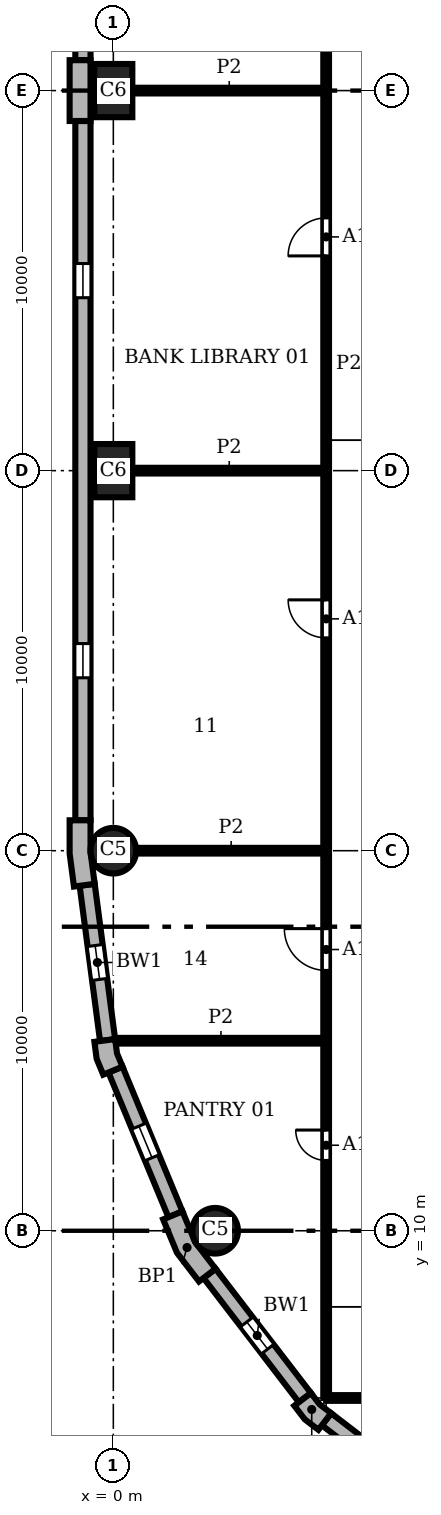
"""IFC4 building model, lengths in metres.
Left out: names, types, materials, properties, quantities, classifications, styles, units other than length and angle.
Written with IfcOpenShell. Run it as: python <this file> out.ifc"""

import sys

from ifc_helpers import new_model, si_unit, direction, frame, frame_2d, origin, origin_2d, place, context, subcontext, project, spatial, polyline, rectangle, circle, outline, extrude, element, fill, save


model = new_model("IFC4")
c1 = context("Model", 3, precision=1e-05, world=origin(), true_north=direction((0.0, 1.0)))
c2 = subcontext(c1, "Body", "Model", "MODEL_VIEW")
j1 = project(units=[si_unit("LENGTHUNIT", "METRE"), si_unit("PLANEANGLEUNIT", "RADIAN")], contexts=[c1])
p1 = place(None, origin())
s1 = spatial("IfcSite", under=j1, at=p1, CompositionType="ELEMENT")
p2 = place(p1, origin())
s2 = spatial("IfcBuilding", under=s1, at=p2, CompositionType="ELEMENT")
p3 = place(p2, frame((0.0, 0.0, 12.0)))
s3 = spatial("IfcBuildingStorey", under=s2, at=p3, CompositionType="ELEMENT", Elevation=12.0)
for number, where, z_axis, x_axis in (
    (1, (0.0, 40.0, 0.0), (0.0, 0.0, 1.0), (0.0, 1.0, 0.0)),
    (2, (0.0, 30.0, 0.0), (0.0, 0.0, 1.0), (0.0, 1.0, 0.0)),
):
    element("IfcColumn", number, at=place(p3, frame(where, z_axis=z_axis, x_axis=x_axis)), inside=s3, PredefinedType="COLUMN", context=c2, shape_type="SweptSolid", body=[
        extrude(rectangle(XDim=1.4, YDim=1.0, at=origin_2d()), origin(), (0.0, 0.0, 1.0), 3.9),
    ])
for number, where, z_axis, x_axis in (
    (3, (0.0, 20.0, 0.0), (0.0, 0.0, 1.0), (1.0, 0.0, 0.0)),
    (4, (2.679, 10.0, 0.0), (0.0, 0.0, 1.0), (1.0, 0.0, 0.0)),
):
    element("IfcColumn", number, at=place(p3, frame(where, z_axis=z_axis, x_axis=x_axis)), inside=s3, PredefinedType="COLUMN", context=c2, shape_type="SweptSolid", body=[
        extrude(circle(Radius=0.6, at=origin_2d()), origin(), (0.0, 0.0, 1.0), 3.9),
    ])
p4 = place(p3, origin())
e5 = element("IfcWall", 5, at=p4, inside=s3, PredefinedType="SOLIDWALL", context=c2, shape_type="SweptSolid", body=[
    extrude(outline(polyline([(-1.0, 40.8), (-1.15, 40.8), (-1.15, 40.0), (-1.15, 39.2), (-1.0, 39.2), (-0.6, 39.2), (-0.6, 40.0), (-0.6, 40.8), (-1.0, 40.8)])), origin(), (0.0, 0.0, 1.0), 3.9),
])
e6 = element("IfcWall", 6, at=p4, inside=s3, PredefinedType="SOLIDWALL", context=c2, shape_type="SweptSolid", body=[
    extrude(outline(polyline([(-1.0, 20.8), (-1.15, 20.8), (-1.15, 19.925), (-1.036, 19.057), (-0.887, 19.076), (-0.49, 19.128), (-0.6, 19.961), (-0.6, 20.8), (-1.0, 20.8)])), origin(), (0.0, 0.0, 1.0), 3.9),
])
e7 = element("IfcWall", 7, at=p4, inside=s3, PredefinedType="SOLIDWALL", context=c2, shape_type="SweptSolid", body=[
    extrude(outline(polyline([(-0.349, 14.99), (-0.498, 14.971), (-0.439, 14.523), (-0.266, 14.106), (-0.128, 14.164), (0.242, 14.317), (0.097, 14.667), (0.047, 15.043), (-0.349, 14.99)])), origin(), (0.0, 0.0, 1.0), 3.9),
])
e8 = element("IfcWall", 8, at=p4, inside=s3, PredefinedType="SOLIDWALL", context=c2, shape_type="SweptSolid", body=[
    extrude(outline(polyline([(1.449, 10.356), (1.311, 10.299), (1.675, 9.42), (2.254, 8.665), (2.373, 8.757), (2.69, 9.0), (2.155, 9.698), (1.819, 10.51), (1.449, 10.356)])), origin(), (0.0, 0.0, 1.0), 3.9),
])
e9 = element("IfcWall", 9, at=p4, inside=s3, PredefinedType="SOLIDWALL", context=c2, shape_type="SweptSolid", body=[
    extrude(outline(polyline([(4.882, 5.487), (4.763, 5.396), (5.038, 5.038), (5.396, 4.763), (5.487, 4.882), (5.731, 5.199), (5.43, 5.43), (5.199, 5.731), (4.882, 5.487)])), origin(), (0.0, 0.0, 1.0), 3.9),
])
p5 = place(p3, frame((-0.8, 59.2, 0.0), z_axis=(0.0, 0.0, 1.0), x_axis=(0.0, -1.0, 0.0)))
e10 = element("IfcWall", 10, at=p5, inside=s3, PredefinedType="SOLIDWALL", context=c2, shape_type="SweptSolid", body=[
    extrude(rectangle(XDim=18.4, YDim=0.4, at=frame_2d((9.2, 0.0))), origin(), (0.0, 0.0, 1.0), 3.9),
])
p6 = place(p5, frame((3.75, 0.0, 0.9)))
e11 = element("IfcOpeningElement", 11, at=p6, cuts=e10, PredefinedType="OPENING", context=c2, shape_type="SweptSolid", body=[
    extrude(rectangle(XDim=0.9, YDim=2.35, at=frame_2d((0.45, 1.175))), frame((0.0, 0.21, 0.0), z_axis=(0.0, -1.0, 0.0), x_axis=(1.0, 0.0, 0.0)), (0.0, 0.0, 1.0), 0.42),
])
p7 = place(p5, frame((13.75, 0.0, 0.9)))
e12 = element("IfcOpeningElement", 12, at=p7, cuts=e10, PredefinedType="OPENING", context=c2, shape_type="SweptSolid", body=[
    extrude(rectangle(XDim=0.9, YDim=2.35, at=frame_2d((0.45, 1.175))), frame((0.0, 0.21, 0.0), z_axis=(0.0, -1.0, 0.0), x_axis=(1.0, 0.0, 0.0)), (0.0, 0.0, 1.0), 0.42),
])
p8 = place(p3, frame((-0.8, 39.2, 0.0), z_axis=(0.0, 0.0, 1.0), x_axis=(0.0, -1.0, 0.0)))
e13 = element("IfcWall", 13, at=p8, inside=s3, PredefinedType="SOLIDWALL", context=c2, shape_type="SweptSolid", body=[
    extrude(rectangle(XDim=18.4, YDim=0.4, at=frame_2d((9.2, 0.0))), origin(), (0.0, 0.0, 1.0), 3.9),
])
p9 = place(p8, frame((3.75, 0.0, 0.9)))
e14 = element("IfcOpeningElement", 14, at=p9, cuts=e13, PredefinedType="OPENING", context=c2, shape_type="SweptSolid", body=[
    extrude(rectangle(XDim=0.9, YDim=2.35, at=frame_2d((0.45, 1.175))), frame((0.0, 0.21, 0.0), z_axis=(0.0, -1.0, 0.0), x_axis=(1.0, 0.0, 0.0)), (0.0, 0.0, 1.0), 0.42),
])
p10 = place(p8, frame((13.75, 0.0, 0.9)))
e15 = element("IfcOpeningElement", 15, at=p10, cuts=e13, PredefinedType="OPENING", context=c2, shape_type="SweptSolid", body=[
    extrude(rectangle(XDim=0.9, YDim=2.35, at=frame_2d((0.45, 1.175))), frame((0.0, 0.21, 0.0), z_axis=(0.0, -1.0, 0.0), x_axis=(1.0, 0.0, 0.0)), (0.0, 0.0, 1.0), 0.42),
])
p11 = place(p3, frame((-0.689, 19.102, 0.0), z_axis=(0.0, 0.0, 1.0), x_axis=(0.130514280502, -0.991446429508, 0.0)))
e16 = element("IfcWall", 16, at=p11, inside=s3, PredefinedType="SOLIDWALL", context=c2, shape_type="SweptSolid", body=[
    extrude(rectangle(XDim=4.121, YDim=0.4, at=frame_2d((2.061, 0.0))), origin(), (0.0, 0.0, 1.0), 3.9),
])
p12 = place(p11, frame((1.611, 0.0, 0.9)))
e17 = element("IfcOpeningElement", 17, at=p12, cuts=e16, PredefinedType="OPENING", context=c2, shape_type="SweptSolid", body=[
    extrude(rectangle(XDim=0.9, YDim=2.35, at=frame_2d((0.45, 1.175))), frame((0.0, 0.21, 0.0), z_axis=(0.0, -1.0, 0.0), x_axis=(1.0, 0.0, 0.0)), (0.0, 0.0, 1.0), 0.42),
])
p13 = place(p3, frame((0.057, 14.24, 0.0), z_axis=(0.0, 0.0, 1.0), x_axis=(0.382721546029, -0.923863744394, 0.0)))
e18 = element("IfcWall", 18, at=p13, inside=s3, PredefinedType="SOLIDWALL", context=c2, shape_type="SweptSolid", body=[
    extrude(rectangle(XDim=4.121, YDim=0.4, at=frame_2d((2.061, 0.0))), origin(), (0.0, 0.0, 1.0), 3.9),
])
p14 = place(p13, frame((1.611, 0.0, 0.9)))
e19 = element("IfcOpeningElement", 19, at=p14, cuts=e18, PredefinedType="OPENING", context=c2, shape_type="SweptSolid", body=[
    extrude(rectangle(XDim=0.9, YDim=2.35, at=frame_2d((0.45, 1.175))), frame((0.0, 0.21, 0.0), z_axis=(0.0, -1.0, 0.0), x_axis=(1.0, 0.0, 0.0)), (0.0, 0.0, 1.0), 0.42),
])
p15 = place(p3, frame((2.532, 8.878, 0.0), z_axis=(0.0, 0.0, 1.0), x_axis=(0.608759824817, -0.793354571229, 0.0)))
e20 = element("IfcWall", 20, at=p15, inside=s3, PredefinedType="SOLIDWALL", context=c2, shape_type="SweptSolid", body=[
    extrude(rectangle(XDim=4.121, YDim=0.4, at=frame_2d((2.061, 0.0))), origin(), (0.0, 0.0, 1.0), 3.9),
])
p16 = place(p15, frame((1.611, 0.0, 0.9)))
e21 = element("IfcOpeningElement", 21, at=p16, cuts=e20, PredefinedType="OPENING", context=c2, shape_type="SweptSolid", body=[
    extrude(rectangle(XDim=0.9, YDim=2.35, at=frame_2d((0.45, 1.175))), frame((0.0, 0.21, 0.0), z_axis=(0.0, -1.0, 0.0), x_axis=(1.0, 0.0, 0.0)), (0.0, 0.0, 1.0), 0.42),
])
p17 = place(p3, frame((5.609, 5.041, 0.0), z_axis=(0.0, 0.0, 1.0), x_axis=(0.793354571229, -0.608759824817, 0.0)))
e22 = element("IfcWall", 22, at=p17, inside=s3, PredefinedType="SOLIDWALL", context=c2, shape_type="SweptSolid", body=[
    extrude(rectangle(XDim=4.121, YDim=0.4, at=frame_2d((2.061, 0.0))), origin(), (0.0, 0.0, 1.0), 3.9),
])
p18 = place(p17, frame((1.611, 0.0, 0.9)))
e23 = element("IfcOpeningElement", 23, at=p18, cuts=e22, PredefinedType="OPENING", context=c2, shape_type="SweptSolid", body=[
    extrude(rectangle(XDim=0.9, YDim=2.35, at=frame_2d((0.45, 1.175))), frame((0.0, 0.21, 0.0), z_axis=(0.0, -1.0, 0.0), x_axis=(1.0, 0.0, 0.0)), (0.0, 0.0, 1.0), 0.42),
])
p19 = place(p3, frame((5.6, 5.6, 0.0), z_axis=(0.0, 0.0, 1.0), x_axis=(0.0, 1.0, 0.0)))
e24 = element("IfcWall", 24, at=p19, inside=s3, PredefinedType="PARTITIONING", context=c2, shape_type="SweptSolid", body=[
    extrude(rectangle(XDim=54.4, YDim=0.15, at=frame_2d((27.2, 0.0))), origin(), (0.0, 0.0, 1.0), 3.58),
])
p20 = place(p19, frame((6.25, 0.0, 0.0)))
e25 = element("IfcOpeningElement", 25, at=p20, cuts=e24, PredefinedType="OPENING", context=c2, shape_type="SweptSolid", body=[
    extrude(rectangle(XDim=0.8, YDim=2.1, at=frame_2d((0.4, 1.05))), frame((0.0, 0.085, 0.0), z_axis=(0.0, -1.0, 0.0), x_axis=(1.0, 0.0, 0.0)), (0.0, 0.0, 1.0), 0.17),
])
p21 = place(p19, frame((11.25, 0.0, 0.0)))
e26 = element("IfcOpeningElement", 26, at=p21, cuts=e24, PredefinedType="OPENING", context=c2, shape_type="SweptSolid", body=[
    extrude(rectangle(XDim=1.1, YDim=2.1, at=frame_2d((0.55, 1.05))), frame((0.0, 0.085, 0.0), z_axis=(0.0, -1.0, 0.0), x_axis=(1.0, 0.0, 0.0)), (0.0, 0.0, 1.0), 0.17),
])
p22 = place(p19, frame((20.0, 0.0, 0.0)))
e27 = element("IfcOpeningElement", 27, at=p22, cuts=e24, PredefinedType="OPENING", context=c2, shape_type="SweptSolid", body=[
    extrude(rectangle(XDim=1.0, YDim=2.1, at=frame_2d((0.5, 1.05))), frame((0.0, 0.085, 0.0), z_axis=(0.0, -1.0, 0.0), x_axis=(1.0, 0.0, 0.0)), (0.0, 0.0, 1.0), 0.17),
])
p23 = place(p19, frame((30.05, 0.0, 0.0)))
e28 = element("IfcOpeningElement", 28, at=p23, cuts=e24, PredefinedType="OPENING", context=c2, shape_type="SweptSolid", body=[
    extrude(rectangle(XDim=1.0, YDim=2.1, at=frame_2d((0.5, 1.05))), frame((0.0, 0.085, 0.0), z_axis=(0.0, -1.0, 0.0), x_axis=(1.0, 0.0, 0.0)), (0.0, 0.0, 1.0), 0.17),
])
p24 = place(p19, frame((38.5, 0.0, 0.0)))
e29 = element("IfcOpeningElement", 29, at=p24, cuts=e24, PredefinedType="OPENING", context=c2, shape_type="SweptSolid", body=[
    extrude(rectangle(XDim=1.0, YDim=2.1, at=frame_2d((0.5, 1.05))), frame((0.0, 0.085, 0.0), z_axis=(0.0, -1.0, 0.0), x_axis=(1.0, 0.0, 0.0)), (0.0, 0.0, 1.0), 0.17),
])
p25 = place(p19, frame((47.5, 0.0, 0.0)))
e30 = element("IfcOpeningElement", 30, at=p25, cuts=e24, PredefinedType="OPENING", context=c2, shape_type="SweptSolid", body=[
    extrude(rectangle(XDim=1.0, YDim=2.1, at=frame_2d((0.5, 1.05))), frame((0.0, 0.085, 0.0), z_axis=(0.0, -1.0, 0.0), x_axis=(1.0, 0.0, 0.0)), (0.0, 0.0, 1.0), 0.17),
])
p26 = place(p3, frame((5.6, 5.6, 0.0), z_axis=(0.0, 0.0, 1.0), x_axis=(1.0, 0.0, 0.0)))
e31 = element("IfcWall", 31, at=p26, inside=s3, PredefinedType="PARTITIONING", context=c2, shape_type="SweptSolid", body=[
    extrude(rectangle(XDim=25.4, YDim=0.15, at=frame_2d((12.7, 0.0))), origin(), (0.0, 0.0, 1.0), 3.58),
])
p27 = place(p3, frame((0.063, 15.0, 0.0), z_axis=(0.0, 0.0, 1.0), x_axis=(1.0, 0.0, 0.0)))
e32 = element("IfcWall", 32, at=p27, inside=s3, PredefinedType="PARTITIONING", context=c2, shape_type="SweptSolid", body=[
    extrude(rectangle(XDim=5.537, YDim=0.15, at=frame_2d((2.769, 0.0))), origin(), (0.0, 0.0, 1.0), 3.58),
])
p28 = place(p3, frame((0.6, 20.0, 0.0), z_axis=(0.0, 0.0, 1.0), x_axis=(1.0, 0.0, 0.0)))
e33 = element("IfcWall", 33, at=p28, inside=s3, PredefinedType="PARTITIONING", context=c2, shape_type="SweptSolid", body=[
    extrude(rectangle(XDim=5.0, YDim=0.15, at=frame_2d((2.5, 0.0))), origin(), (0.0, 0.0, 1.0), 3.58),
])
for number, where, z_axis, x_axis in (
    (34, (0.5, 30.0, 0.0), (0.0, 0.0, 1.0), (1.0, 0.0, 0.0)),
    (35, (0.5, 40.0, 0.0), (0.0, 0.0, 1.0), (1.0, 0.0, 0.0)),
):
    element("IfcWall", number, at=place(p3, frame(where, z_axis=z_axis, x_axis=x_axis)), inside=s3, PredefinedType="PARTITIONING", context=c2, shape_type="SweptSolid", body=[
        extrude(rectangle(XDim=5.1, YDim=0.15, at=frame_2d((2.55, 0.0))), origin(), (0.0, 0.0, 1.0), 3.58),
    ])
p29 = place(p9, origin())
e36 = element("IfcWindow", 36, at=p29, inside=s3, PartitioningType="SINGLE_PANEL", PredefinedType="WINDOW", context=c2, shape_type="SweptSolid", body=[
    extrude(rectangle(XDim=0.9, YDim=2.35, at=frame_2d((0.45, 1.175))), frame((0.0, 0.16, 0.0), z_axis=(0.0, -1.0, 0.0), x_axis=(1.0, 0.0, 0.0)), (0.0, 0.0, 1.0), 0.06),
])
fill(e14, e36)
p30 = place(p10, origin())
e37 = element("IfcWindow", 37, at=p30, inside=s3, PartitioningType="SINGLE_PANEL", PredefinedType="WINDOW", context=c2, shape_type="SweptSolid", body=[
    extrude(rectangle(XDim=0.9, YDim=2.35, at=frame_2d((0.45, 1.175))), frame((0.0, 0.16, 0.0), z_axis=(0.0, -1.0, 0.0), x_axis=(1.0, 0.0, 0.0)), (0.0, 0.0, 1.0), 0.06),
])
fill(e15, e37)
p31 = place(p12, origin())
e38 = element("IfcWindow", 38, at=p31, inside=s3, PartitioningType="SINGLE_PANEL", PredefinedType="WINDOW", context=c2, shape_type="SweptSolid", body=[
    extrude(rectangle(XDim=0.9, YDim=2.35, at=frame_2d((0.45, 1.175))), frame((0.0, 0.16, 0.0), z_axis=(0.0, -1.0, 0.0), x_axis=(1.0, 0.0, 0.0)), (0.0, 0.0, 1.0), 0.06),
])
fill(e17, e38)
p32 = place(p14, origin())
e39 = element("IfcWindow", 39, at=p32, inside=s3, PartitioningType="SINGLE_PANEL", PredefinedType="WINDOW", context=c2, shape_type="SweptSolid", body=[
    extrude(rectangle(XDim=0.9, YDim=2.35, at=frame_2d((0.45, 1.175))), frame((0.0, 0.16, 0.0), z_axis=(0.0, -1.0, 0.0), x_axis=(1.0, 0.0, 0.0)), (0.0, 0.0, 1.0), 0.06),
])
fill(e19, e39)
p33 = place(p16, origin())
e40 = element("IfcWindow", 40, at=p33, inside=s3, PartitioningType="SINGLE_PANEL", PredefinedType="WINDOW", context=c2, shape_type="SweptSolid", body=[
    extrude(rectangle(XDim=0.9, YDim=2.35, at=frame_2d((0.45, 1.175))), frame((0.0, 0.16, 0.0), z_axis=(0.0, -1.0, 0.0), x_axis=(1.0, 0.0, 0.0)), (0.0, 0.0, 1.0), 0.06),
])
fill(e21, e40)
p34 = place(p20, origin())
e41 = element("IfcDoor", 41, at=p34, inside=s3, OperationType="SINGLE_SWING_RIGHT", PredefinedType="DOOR", context=c2, shape_type="SweptSolid", body=[
    extrude(rectangle(XDim=0.8, YDim=2.1, at=frame_2d((0.4, 1.05))), frame((0.0, 0.025, 0.0), z_axis=(0.0, -1.0, 0.0), x_axis=(1.0, 0.0, 0.0)), (0.0, 0.0, 1.0), 0.05),
])
fill(e25, e41)
p35 = place(p21, origin())
e42 = element("IfcDoor", 42, at=p35, inside=s3, OperationType="SINGLE_SWING_RIGHT", PredefinedType="DOOR", context=c2, shape_type="SweptSolid", body=[
    extrude(rectangle(XDim=1.1, YDim=2.1, at=frame_2d((0.55, 1.05))), frame((0.0, 0.025, 0.0), z_axis=(0.0, -1.0, 0.0), x_axis=(1.0, 0.0, 0.0)), (0.0, 0.0, 1.0), 0.05),
])
fill(e26, e42)
p36 = place(p22, origin())
e43 = element("IfcDoor", 43, at=p36, inside=s3, OperationType="SINGLE_SWING_RIGHT", PredefinedType="DOOR", context=c2, shape_type="SweptSolid", body=[
    extrude(rectangle(XDim=1.0, YDim=2.1, at=frame_2d((0.5, 1.05))), frame((0.0, 0.025, 0.0), z_axis=(0.0, -1.0, 0.0), x_axis=(1.0, 0.0, 0.0)), (0.0, 0.0, 1.0), 0.05),
])
fill(e27, e43)
p37 = place(p23, origin())
e44 = element("IfcDoor", 44, at=p37, inside=s3, OperationType="SINGLE_SWING_LEFT", PredefinedType="DOOR", context=c2, shape_type="SweptSolid", body=[
    extrude(rectangle(XDim=1.0, YDim=2.1, at=frame_2d((0.5, 1.05))), frame((0.0, 0.025, 0.0), z_axis=(0.0, -1.0, 0.0), x_axis=(1.0, 0.0, 0.0)), (0.0, 0.0, 1.0), 0.05),
])
fill(e28, e44)
save(model, sys.argv[1])
